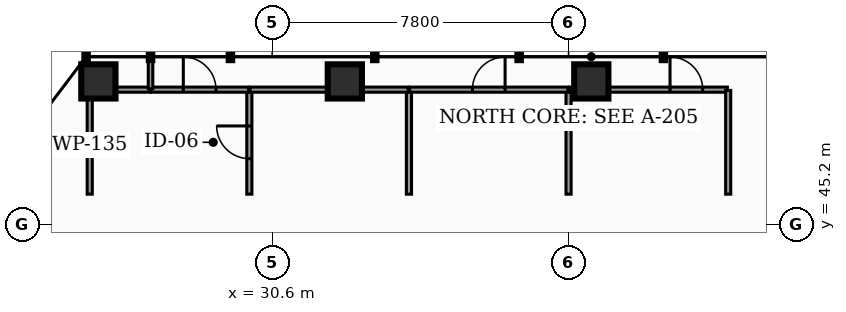
"""IFC4 building model, lengths in metres.
Left out: names, types, materials, properties, quantities, classifications, styles, units other than length and angle.
Written with IfcOpenShell. Run it as: python <this file> out.ifc"""

import sys

from ifc_helpers import new_model, si_unit, direction, frame, frame_2d, origin, origin_2d, place, context, subcontext, project, spatial, rectangle, hollow_rectangle, extrude, element, fill, save


model = new_model("IFC4")
c1 = context("Model", 3, precision=1e-05, world=origin(), true_north=direction((0.0, 1.0)))
c2 = subcontext(c1, "Body", "Model", "MODEL_VIEW")
j1 = project(units=[si_unit("LENGTHUNIT", "METRE"), si_unit("PLANEANGLEUNIT", "RADIAN")], contexts=[c1])
p1 = place(None, origin())
s1 = spatial("IfcSite", under=j1, at=p1, CompositionType="ELEMENT")
p2 = place(p1, origin())
s2 = spatial("IfcBuilding", under=s1, at=p2, CompositionType="ELEMENT")
p3 = place(p2, frame((0.0, 0.0, 92.82)))
s3 = spatial("IfcBuildingStorey", under=s2, at=p3, CompositionType="ELEMENT", Elevation=92.82)
p4 = place(p3, frame((38.998, 48.967, 0.0), z_axis=(-0.004982912982, -0.030536312892, 0.99952123748), x_axis=(0.986946279333, -0.161049811272, 0.0)))
e1 = element("IfcColumn", 1, at=p4, inside=s3, PredefinedType="COLUMN", context=c2, shape_type="SweptSolid", body=[
    extrude(hollow_rectangle(XDim=0.9, YDim=0.9, WallThickness=0.045, at=origin_2d()), origin(), (0.0, 0.0, 1.0), 3.822),
])
p5 = place(p3, frame((32.513, 48.967, 0.0), z_axis=(-0.073015981642, -0.03045518257, 0.996865662103), x_axis=(0.384958466778, -0.922933897338, 0.0)))
e2 = element("IfcColumn", 2, at=p5, inside=s3, PredefinedType="COLUMN", context=c2, shape_type="SweptSolid", body=[
    extrude(hollow_rectangle(XDim=0.9, YDim=0.9, WallThickness=0.045, at=origin_2d()), origin(), (0.0, 0.0, 1.0), 3.832),
])
p6 = place(p3, frame((26.028, 48.967, 0.0), z_axis=(-0.140169960951, -0.030235217209, 0.989665708049), x_axis=(0.210854401994, -0.977517478698, 0.0)))
e3 = element("IfcColumn", 3, at=p6, inside=s3, PredefinedType="COLUMN", context=c2, shape_type="SweptSolid", body=[
    extrude(hollow_rectangle(XDim=0.9, YDim=0.9, WallThickness=0.045, at=origin_2d()), origin(), (0.0, 0.0, 1.0), 3.86),
])
p7 = place(p3, frame((30.0, 46.0, 0.0), z_axis=(0.0, 0.0, 1.0), x_axis=(0.0, 1.0, 0.0)))
e4 = element("IfcWall", 4, at=p7, inside=s3, PredefinedType="PARTITIONING", context=c2, shape_type="SweptSolid", body=[
    extrude(rectangle(XDim=2.73, YDim=0.135, at=frame_2d((1.365, 0.0))), origin(), (0.0, 0.0, 1.0), 2.777),
])
p8 = place(p7, frame((0.935, 0.0, 0.0)))
e5 = element("IfcOpeningElement", 5, at=p8, cuts=e4, PredefinedType="OPENING", context=c2, shape_type="SweptSolid", body=[
    extrude(rectangle(XDim=0.86, YDim=2.05, at=frame_2d((0.43, 1.025))), frame((0.0, 0.077, 0.0), z_axis=(0.0, -1.0, 0.0), x_axis=(1.0, 0.0, 0.0)), (0.0, 0.0, 1.0), 0.155),
])
p9 = place(p3, frame((27.405, 48.75, 0.0), z_axis=(0.0, 0.0, 1.0), x_axis=(1.0, 0.0, 0.0)))
e6 = element("IfcWall", 6, at=p9, inside=s3, PredefinedType="PARTITIONING", context=c2, shape_type="SweptSolid", body=[
    extrude(rectangle(XDim=2.575, YDim=0.135, at=frame_2d((1.288, 0.0))), origin(), (0.0, 0.0, 1.0), 2.777),
])
p10 = place(p9, frame((0.857, 0.0, 0.0)))
e7 = element("IfcOpeningElement", 7, at=p10, cuts=e6, PredefinedType="OPENING", context=c2, shape_type="SweptSolid", body=[
    extrude(rectangle(XDim=0.86, YDim=2.05, at=frame_2d((0.43, 1.025))), frame((0.0, 0.077, 0.0), z_axis=(0.0, -1.0, 0.0), x_axis=(1.0, 0.0, 0.0)), (0.0, 0.0, 1.0), 0.155),
])
p11 = place(p3, frame((25.8, 46.0, 0.0), z_axis=(0.0, 0.0, 1.0), x_axis=(0.0, 1.0, 0.0)))
e8 = element("IfcWall", 8, at=p11, inside=s3, PredefinedType="PARTITIONING", context=c2, shape_type="SweptSolid", body=[
    extrude(rectangle(XDim=2.584, YDim=0.135, at=frame_2d((1.292, 0.0))), origin(), (0.0, 0.0, 1.0), 2.777),
])
p12 = place(p3, frame((25.966, 48.75, 0.0), z_axis=(0.0, 0.0, 1.0), x_axis=(1.0, 0.0, 0.0)))
e9 = element("IfcWall", 9, at=p12, inside=s3, PredefinedType="PARTITIONING", context=c2, shape_type="SweptSolid", body=[
    extrude(rectangle(XDim=1.429, YDim=0.135, at=frame_2d((0.715, 0.0))), origin(), (0.0, 0.0, 1.0), 2.777),
])
p13 = place(p3, frame((34.2, 46.0, 0.0), z_axis=(0.0, 0.0, 1.0), x_axis=(0.0, 1.0, 0.0)))
e10 = element("IfcWall", 10, at=p13, inside=s3, PredefinedType="PARTITIONING", context=c2, shape_type="SweptSolid", body=[
    extrude(rectangle(XDim=2.73, YDim=0.135, at=frame_2d((1.365, 0.0))), origin(), (0.0, 0.0, 1.0), 2.777),
])
p14 = place(p3, frame((30.02, 48.75, 0.0), z_axis=(0.0, 0.0, 1.0), x_axis=(1.0, 0.0, 0.0)))
e11 = element("IfcWall", 11, at=p14, inside=s3, PredefinedType="PARTITIONING", context=c2, shape_type="SweptSolid", body=[
    extrude(rectangle(XDim=4.16, YDim=0.135, at=frame_2d((2.08, 0.0))), origin(), (0.0, 0.0, 1.0), 2.777),
])
p15 = place(p3, frame((38.4, 46.0, 0.0), z_axis=(0.0, 0.0, 1.0), x_axis=(0.0, 1.0, 0.0)))
e12 = element("IfcWall", 12, at=p15, inside=s3, PredefinedType="PARTITIONING", context=c2, shape_type="SweptSolid", body=[
    extrude(rectangle(XDim=2.73, YDim=0.135, at=frame_2d((1.365, 0.0))), origin(), (0.0, 0.0, 1.0), 2.777),
])
p16 = place(p3, frame((34.22, 48.75, 0.0), z_axis=(0.0, 0.0, 1.0), x_axis=(1.0, 0.0, 0.0)))
e13 = element("IfcWall", 13, at=p16, inside=s3, PredefinedType="PARTITIONING", context=c2, shape_type="SweptSolid", body=[
    extrude(rectangle(XDim=4.16, YDim=0.135, at=frame_2d((2.08, 0.0))), origin(), (0.0, 0.0, 1.0), 2.777),
])
p17 = place(p16, frame((1.65, 0.0, 0.0)))
e14 = element("IfcOpeningElement", 14, at=p17, cuts=e13, PredefinedType="OPENING", context=c2, shape_type="SweptSolid", body=[
    extrude(rectangle(XDim=0.86, YDim=2.05, at=frame_2d((0.43, 1.025))), frame((0.0, 0.077, 0.0), z_axis=(0.0, -1.0, 0.0), x_axis=(1.0, 0.0, 0.0)), (0.0, 0.0, 1.0), 0.155),
])
p18 = place(p3, frame((38.42, 48.75, 0.0), z_axis=(0.0, 0.0, 1.0), x_axis=(1.0, 0.0, 0.0)))
e15 = element("IfcWall", 15, at=p18, inside=s3, PredefinedType="PARTITIONING", context=c2, shape_type="SweptSolid", body=[
    extrude(rectangle(XDim=4.16, YDim=0.135, at=frame_2d((2.08, 0.0))), origin(), (0.0, 0.0, 1.0), 2.777),
])
p19 = place(p18, frame((2.65, 0.0, 0.0)))
e16 = element("IfcOpeningElement", 16, at=p19, cuts=e15, PredefinedType="OPENING", context=c2, shape_type="SweptSolid", body=[
    extrude(rectangle(XDim=0.86, YDim=2.05, at=frame_2d((0.43, 1.025))), frame((0.0, 0.077, 0.0), z_axis=(0.0, -1.0, 0.0), x_axis=(1.0, 0.0, 0.0)), (0.0, 0.0, 1.0), 0.155),
])
p20 = place(p3, frame((42.6, 46.0, 0.0), z_axis=(0.0, 0.0, 1.0), x_axis=(0.0, 1.0, 0.0)))
e17 = element("IfcWall", 17, at=p20, inside=s3, PredefinedType="PARTITIONING", context=c2, shape_type="SweptSolid", body=[
    extrude(rectangle(XDim=2.73, YDim=0.135, at=frame_2d((1.365, 0.0))), origin(), (0.0, 0.0, 1.0), 2.777),
])
p21 = place(p3, frame((27.4, 48.77, 0.0), z_axis=(0.0, 0.0, 1.0), x_axis=(0.0, 1.0, 0.0)))
e18 = element("IfcWall", 18, at=p21, inside=s3, PredefinedType="PARTITIONING", context=c2, shape_type="SweptSolid", body=[
    extrude(rectangle(XDim=0.832, YDim=0.12, at=frame_2d((0.416, 0.0))), origin(), (0.0, 0.0, 1.0), 2.777),
])
p22 = place(p8, origin())
e19 = element("IfcDoor", 19, at=p22, inside=s3, OperationType="SINGLE_SWING_RIGHT", PredefinedType="DOOR", context=c2, shape_type="SweptSolid", body=[
    extrude(rectangle(XDim=0.86, YDim=2.05, at=frame_2d((0.43, 1.025))), frame((0.0, 0.025, 0.0), z_axis=(0.0, -1.0, 0.0), x_axis=(1.0, 0.0, 0.0)), (0.0, 0.0, 1.0), 0.05),
])
fill(e5, e19)
p23 = place(p10, origin())
e20 = element("IfcDoor", 20, at=p23, inside=s3, OperationType="SINGLE_SWING_LEFT", PredefinedType="DOOR", context=c2, shape_type="SweptSolid", body=[
    extrude(rectangle(XDim=0.86, YDim=2.05, at=frame_2d((0.43, 1.025))), frame((0.0, 0.025, 0.0), z_axis=(0.0, -1.0, 0.0), x_axis=(1.0, 0.0, 0.0)), (0.0, 0.0, 1.0), 0.05),
])
fill(e7, e20)
p24 = place(p17, origin())
e21 = element("IfcDoor", 21, at=p24, inside=s3, OperationType="SINGLE_SWING_RIGHT", PredefinedType="DOOR", context=c2, shape_type="SweptSolid", body=[
    extrude(rectangle(XDim=0.86, YDim=2.05, at=frame_2d((0.43, 1.025))), frame((0.0, 0.025, 0.0), z_axis=(0.0, -1.0, 0.0), x_axis=(1.0, 0.0, 0.0)), (0.0, 0.0, 1.0), 0.05),
])
fill(e14, e21)
p25 = place(p19, origin())
e22 = element("IfcDoor", 22, at=p25, inside=s3, OperationType="SINGLE_SWING_LEFT", PredefinedType="DOOR", context=c2, shape_type="SweptSolid", body=[
    extrude(rectangle(XDim=0.86, YDim=2.05, at=frame_2d((0.43, 1.025))), frame((0.0, 0.025, 0.0), z_axis=(0.0, -1.0, 0.0), x_axis=(1.0, 0.0, 0.0)), (0.0, 0.0, 1.0), 0.05),
])
fill(e16, e22)
save(model, sys.argv[1])
